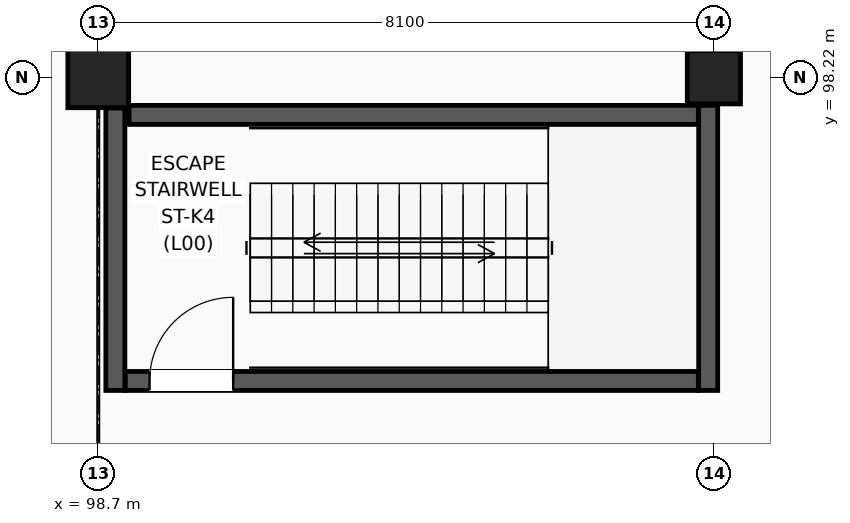
"""IFC4 building model, lengths in metres.
Left out: names, types, materials, properties, quantities, classifications, styles, units other than length and angle.
Written with IfcOpenShell. Run it as: python <this file> out.ifc"""

import sys

from ifc_helpers import new_model, si_unit, direction, frame, frame_2d, origin, origin_2d, place, context, subcontext, project, spatial, rectangle, extrude, element, fill, save


model = new_model("IFC4")
c1 = context("Model", 3, precision=1e-05, world=origin(), true_north=direction((0.0, 1.0)))
c2 = subcontext(c1, "Body", "Model", "MODEL_VIEW")
j1 = project(units=[si_unit("LENGTHUNIT", "METRE"), si_unit("PLANEANGLEUNIT", "RADIAN")], contexts=[c1])
p1 = place(None, origin())
s1 = spatial("IfcSite", under=j1, at=p1, CompositionType="ELEMENT")
p2 = place(p1, origin())
s2 = spatial("IfcBuilding", under=s1, at=p2, CompositionType="ELEMENT")
p3 = place(p2, origin())
s3 = spatial("IfcBuildingStorey", under=s2, at=p3, CompositionType="ELEMENT", Elevation=0.0)
p4 = place(p3, frame((98.7, 98.22, 0.0), z_axis=(0.0, 0.0, 1.0), x_axis=(1.0, 0.0, 0.0)))
e1 = element("IfcColumn", 1, at=p4, inside=s3, PredefinedType="COLUMN", context=c2, shape_type="SweptSolid", body=[
    extrude(rectangle(XDim=0.8, YDim=0.8, at=origin_2d()), origin(), (0.0, 0.0, 1.0), 5.4),
])
p5 = place(p3, frame((106.8, 98.22, 0.0), z_axis=(0.0, 0.0, 1.0), x_axis=(1.0, 0.0, 0.0)))
e2 = element("IfcColumn", 2, at=p5, inside=s3, PredefinedType="COLUMN", context=c2, shape_type="SweptSolid", body=[
    extrude(rectangle(XDim=0.7, YDim=0.7, at=origin_2d()), origin(), (0.0, 0.0, 1.0), 5.4),
])
p6 = place(p3, frame((99.055, 94.225, 0.0), z_axis=(0.0, 0.0, 1.0), x_axis=(1.0, 0.0, 0.0)))
e3 = element("IfcWall", 3, at=p6, inside=s3, PredefinedType="SHEAR", context=c2, shape_type="SweptSolid", body=[
    extrude(rectangle(XDim=7.54, YDim=0.25, at=frame_2d((3.77, 0.0))), origin(), (0.0, 0.0, 1.0), 5.105),
])
p7 = place(p6, frame((0.32, 0.0, 0.0)))
e4 = element("IfcOpeningElement", 4, at=p7, cuts=e3, PredefinedType="OPENING", context=c2, shape_type="SweptSolid", body=[
    extrude(rectangle(XDim=1.1, YDim=2.2, at=frame_2d((0.55, 1.1))), frame((0.0, 0.135, 0.0), z_axis=(0.0, -1.0, 0.0), x_axis=(1.0, 0.0, 0.0)), (0.0, 0.0, 1.0), 0.27),
])
p8 = place(p3, frame((99.105, 97.725, 0.0), z_axis=(0.0, 0.0, 1.0), x_axis=(1.0, 0.0, 0.0)))
e5 = element("IfcWall", 5, at=p8, inside=s3, PredefinedType="SHEAR", context=c2, shape_type="SweptSolid", body=[
    extrude(rectangle(XDim=7.49, YDim=0.25, at=frame_2d((3.745, 0.0))), origin(), (0.0, 0.0, 1.0), 5.105),
])
p9 = place(p3, frame((98.925, 94.1, 0.0), z_axis=(0.0, 0.0, 1.0), x_axis=(0.0, 1.0, 0.0)))
e6 = element("IfcWall", 6, at=p9, inside=s3, PredefinedType="SHEAR", context=c2, shape_type="SweptSolid", body=[
    extrude(rectangle(XDim=3.715, YDim=0.25, at=frame_2d((1.857, 0.0))), origin(), (0.0, 0.0, 1.0), 5.105),
])
p10 = place(p3, frame((106.725, 94.1, 0.0), z_axis=(0.0, 0.0, 1.0), x_axis=(0.0, 1.0, 0.0)))
e7 = element("IfcWall", 7, at=p10, inside=s3, PredefinedType="SHEAR", context=c2, shape_type="SweptSolid", body=[
    extrude(rectangle(XDim=3.75, YDim=0.25, at=frame_2d((1.875, 0.0))), origin(), (0.0, 0.0, 1.0), 5.105),
])
p11 = place(p7, origin())
e8 = element("IfcDoor", 8, at=p11, inside=s3, OperationType="SINGLE_SWING_RIGHT", PredefinedType="DOOR", context=c2, shape_type="SweptSolid", body=[
    extrude(rectangle(XDim=1.1, YDim=2.2, at=frame_2d((0.55, 1.1))), frame((0.0, 0.025, 0.0), z_axis=(0.0, -1.0, 0.0), x_axis=(1.0, 0.0, 0.0)), (0.0, 0.0, 1.0), 0.05),
])
fill(e4, e8)
save(model, sys.argv[1])
